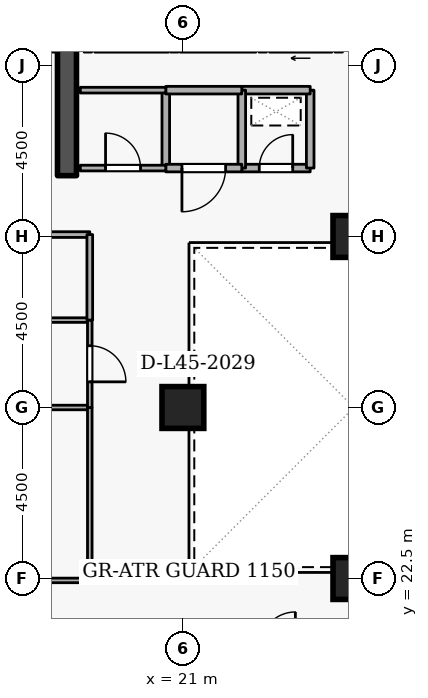
"""IFC4 building model, lengths in metres.
Left out: names, types, materials, properties, quantities, classifications, styles, units other than length and angle.
Written with IfcOpenShell. Run it as: python <this file> out.ifc"""

import sys

from ifc_helpers import new_model, si_unit, direction, frame, frame_2d, origin, origin_2d, place, context, subcontext, project, spatial, rectangle, extrude, element, fill, save


model = new_model("IFC4")
c1 = context("Model", 3, precision=1e-05, world=origin(), true_north=direction((0.0, 1.0)))
c2 = subcontext(c1, "Body", "Model", "MODEL_VIEW")
j1 = project(units=[si_unit("LENGTHUNIT", "METRE"), si_unit("PLANEANGLEUNIT", "RADIAN")], contexts=[c1])
p1 = place(None, origin())
s1 = spatial("IfcSite", under=j1, at=p1, CompositionType="ELEMENT")
p2 = place(p1, origin())
s2 = spatial("IfcBuilding", under=s1, at=p2, CompositionType="ELEMENT")
p3 = place(p2, frame((0.0, 0.0, 170.7)))
s3 = spatial("IfcBuildingStorey", under=s2, at=p3, CompositionType="ELEMENT", Elevation=170.7)
p4 = place(p3, frame((17.95, 33.1, 0.0), z_axis=(0.0, 0.0, 1.0), x_axis=(0.0, 1.0, 0.0)))
e1 = element("IfcWall", 1, at=p4, inside=s3, PredefinedType="SHEAR", context=c2, shape_type="SweptSolid", body=[
    extrude(rectangle(XDim=5.8, YDim=0.5, at=frame_2d((2.9, 0.0))), origin(), (0.0, 0.0, 1.0), 3.6),
])
for number, where, z_axis, x_axis in (
    (2, (25.5, 22.5, 0.0), (0.0, 0.0, 1.0), (1.0, 0.0, 0.0)),
    (3, (25.5, 31.5, 0.0), (0.0, 0.0, 1.0), (1.0, 0.0, 0.0)),
    (4, (21.0, 27.0, 0.0), (0.0, 0.0, 1.0), (1.0, 0.0, 0.0)),
):
    element("IfcColumn", number, at=place(p3, frame(where, z_axis=z_axis, x_axis=x_axis)), inside=s3, PredefinedType="COLUMN", context=c2, shape_type="SweptSolid", body=[
        extrude(rectangle(XDim=1.1, YDim=1.1, at=origin_2d()), origin(), (0.0, 0.0, 1.0), 3.6),
    ])
p5 = place(p3, frame((24.92, 36.45, 0.0), z_axis=(0.0, 0.0, 1.0), x_axis=(-1.0, 0.0, 0.0)))
e5 = element("IfcWall", 5, at=p5, inside=s3, PredefinedType="STANDARD", context=c2, shape_type="SweptSolid", body=[
    extrude(rectangle(XDim=1.64, YDim=0.2, at=frame_2d((0.82, 0.0))), origin(), (0.0, 0.0, 1.0), 3.26),
])
p6 = place(p5, frame((0.31, 0.0, 0.0)))
e6 = element("IfcOpeningElement", 6, at=p6, cuts=e5, PredefinedType="OPENING", context=c2, shape_type="SweptSolid", body=[
    extrude(rectangle(XDim=1.02, YDim=2.06, at=frame_2d((0.51, 1.03))), frame((0.0, 0.11, 0.0), z_axis=(0.0, -1.0, 0.0), x_axis=(1.0, 0.0, 0.0)), (0.0, 0.0, 1.0), 0.22),
])
p7 = place(p3, frame((22.92, 36.45, 0.0), z_axis=(0.0, 0.0, 1.0), x_axis=(-1.0, 0.0, 0.0)))
e7 = element("IfcWall", 7, at=p7, inside=s3, PredefinedType="STANDARD", context=c2, shape_type="SweptSolid", body=[
    extrude(rectangle(XDim=1.99, YDim=0.2, at=frame_2d((0.995, 0.0))), origin(), (0.0, 0.0, 1.0), 3.26),
])
p8 = place(p3, frame((20.62, 36.45, 0.0), z_axis=(0.0, 0.0, 1.0), x_axis=(-1.0, 0.0, 0.0)))
e8 = element("IfcWall", 8, at=p8, inside=s3, PredefinedType="STANDARD", context=c2, shape_type="SweptSolid", body=[
    extrude(rectangle(XDim=1.94, YDim=0.2, at=frame_2d((0.97, 0.0))), origin(), (0.0, 0.0, 1.0), 3.26),
])
p9 = place(p3, frame((22.55, 33.3, 0.0), z_axis=(0.0, 0.0, 1.0), x_axis=(1.0, 0.0, 0.0)))
e9 = element("IfcWall", 9, at=p9, inside=s3, PredefinedType="STANDARD", context=c2, shape_type="SweptSolid", body=[
    extrude(rectangle(XDim=1.8, YDim=0.2, at=frame_2d((0.9, 0.0))), origin(), (0.0, 0.0, 1.0), 3.26),
])
p10 = place(p9, frame((0.46, 0.0, 0.0)))
e10 = element("IfcOpeningElement", 10, at=p10, cuts=e9, PredefinedType="OPENING", context=c2, shape_type="SweptSolid", body=[
    extrude(rectangle(XDim=0.88, YDim=2.04, at=frame_2d((0.44, 1.02))), frame((0.0, 0.11, 0.0), z_axis=(0.0, -1.0, 0.0), x_axis=(1.0, 0.0, 0.0)), (0.0, 0.0, 1.0), 0.22),
])
p11 = place(p3, frame((24.35, 33.3, 0.0), z_axis=(0.0, 0.0, 1.0), x_axis=(0.0, 1.0, 0.0)))
e11 = element("IfcWall", 11, at=p11, inside=s3, PredefinedType="STANDARD", context=c2, shape_type="SweptSolid", body=[
    extrude(rectangle(XDim=2.05, YDim=0.2, at=frame_2d((1.025, 0.0))), origin(), (0.0, 0.0, 1.0), 3.26),
])
p12 = place(p3, frame((24.35, 35.35, 0.0), z_axis=(0.0, 0.0, 1.0), x_axis=(-1.0, 0.0, 0.0)))
e12 = element("IfcWall", 12, at=p12, inside=s3, PredefinedType="STANDARD", context=c2, shape_type="SweptSolid", body=[
    extrude(rectangle(XDim=1.8, YDim=0.2, at=frame_2d((0.9, 0.0))), origin(), (0.0, 0.0, 1.0), 3.26),
])
for number, where, z_axis, x_axis in (
    (13, (22.55, 35.35, 0.0), (0.0, 0.0, 1.0), (0.0, -1.0, 0.0)),
    (14, (20.55, 33.3, 0.0), (0.0, 0.0, 1.0), (0.0, 1.0, 0.0)),
):
    element("IfcWall", number, at=place(p3, frame(where, z_axis=z_axis, x_axis=x_axis)), inside=s3, PredefinedType="STANDARD", context=c2, shape_type="SweptSolid", body=[
        extrude(rectangle(XDim=2.05, YDim=0.2, at=frame_2d((1.025, 0.0))), origin(), (0.0, 0.0, 1.0), 3.26),
    ])
p13 = place(p3, frame((20.55, 35.35, 0.0), z_axis=(0.0, 0.0, 1.0), x_axis=(1.0, 0.0, 0.0)))
e15 = element("IfcWall", 15, at=p13, inside=s3, PredefinedType="STANDARD", context=c2, shape_type="SweptSolid", body=[
    extrude(rectangle(XDim=2.0, YDim=0.2, at=frame_2d((1.0, 0.0))), origin(), (0.0, 0.0, 1.0), 3.26),
])
p14 = place(p3, frame((22.55, 33.3, 0.0), z_axis=(0.0, 0.0, 1.0), x_axis=(-1.0, 0.0, 0.0)))
e16 = element("IfcWall", 16, at=p14, inside=s3, PredefinedType="STANDARD", context=c2, shape_type="SweptSolid", body=[
    extrude(rectangle(XDim=2.0, YDim=0.2, at=frame_2d((1.0, 0.0))), origin(), (0.0, 0.0, 1.0), 3.26),
])
p15 = place(p14, frame((0.425, 0.0, 0.0)))
e17 = element("IfcOpeningElement", 17, at=p15, cuts=e16, PredefinedType="OPENING", context=c2, shape_type="SweptSolid", body=[
    extrude(rectangle(XDim=1.15, YDim=2.1, at=frame_2d((0.575, 1.05))), frame((0.0, 0.11, 0.0), z_axis=(0.0, -1.0, 0.0), x_axis=(1.0, 0.0, 0.0)), (0.0, 0.0, 1.0), 0.22),
])
p16 = place(p3, frame((18.3, 33.3, 0.0), z_axis=(0.0, 0.0, 1.0), x_axis=(1.0, 0.0, 0.0)))
e18 = element("IfcWall", 18, at=p16, inside=s3, PredefinedType="PARTITIONING", context=c2, shape_type="SweptSolid", body=[
    extrude(rectangle(XDim=2.25, YDim=0.15, at=frame_2d((1.125, 0.0))), origin(), (0.0, 0.0, 1.0), 3.26),
])
p17 = place(p16, frame((0.665, 0.0, 0.0)))
e19 = element("IfcOpeningElement", 19, at=p17, cuts=e18, PredefinedType="OPENING", context=c2, shape_type="SweptSolid", body=[
    extrude(rectangle(XDim=0.92, YDim=2.08, at=frame_2d((0.46, 1.04))), frame((0.0, 0.085, 0.0), z_axis=(0.0, -1.0, 0.0), x_axis=(1.0, 0.0, 0.0)), (0.0, 0.0, 1.0), 0.17),
])
p18 = place(p3, frame((20.55, 35.35, 0.0), z_axis=(0.0, 0.0, 1.0), x_axis=(-1.0, 0.0, 0.0)))
e20 = element("IfcWall", 20, at=p18, inside=s3, PredefinedType="PARTITIONING", context=c2, shape_type="SweptSolid", body=[
    extrude(rectangle(XDim=2.25, YDim=0.15, at=frame_2d((1.125, 0.0))), origin(), (0.0, 0.0, 1.0), 3.26),
])
p19 = place(p3, frame((13.25, 27.0, 0.0), z_axis=(0.0, 0.0, 1.0), x_axis=(1.0, 0.0, 0.0)))
e21 = element("IfcWall", 21, at=p19, inside=s3, PredefinedType="PARTITIONING", context=c2, shape_type="SweptSolid", body=[
    extrude(rectangle(XDim=5.3, YDim=0.12, at=frame_2d((2.65, 0.0))), origin(), (0.0, 0.0, 1.0), 2.802),
])
p20 = place(p3, frame((18.55, 27.0, 0.0), z_axis=(0.0, 0.0, 1.0), x_axis=(0.0, -1.0, 0.0)))
e22 = element("IfcWall", 22, at=p20, inside=s3, PredefinedType="PARTITIONING", context=c2, shape_type="SweptSolid", body=[
    extrude(rectangle(XDim=4.55, YDim=0.12, at=frame_2d((2.275, 0.0))), origin(), (0.0, 0.0, 1.0), 3.26),
])
p21 = place(p3, frame((18.55, 22.45, 0.0), z_axis=(0.0, 0.0, 1.0), x_axis=(-1.0, 0.0, 0.0)))
e23 = element("IfcWall", 23, at=p21, inside=s3, PredefinedType="PARTITIONING", context=c2, shape_type="SweptSolid", body=[
    extrude(rectangle(XDim=5.3, YDim=0.12, at=frame_2d((2.65, 0.0))), origin(), (0.0, 0.0, 1.0), 3.26),
])
p22 = place(p21, frame((2.175, 0.0, 0.0)))
e24 = element("IfcOpeningElement", 24, at=p22, cuts=e23, PredefinedType="OPENING", context=c2, shape_type="SweptSolid", body=[
    extrude(rectangle(XDim=0.95, YDim=2.1, at=frame_2d((0.475, 1.05))), frame((0.0, 0.07, 0.0), z_axis=(0.0, -1.0, 0.0), x_axis=(1.0, 0.0, 0.0)), (0.0, 0.0, 1.0), 0.14),
])
p23 = place(p3, frame((13.25, 29.3, 0.0), z_axis=(0.0, 0.0, 1.0), x_axis=(1.0, 0.0, 0.0)))
e25 = element("IfcWall", 25, at=p23, inside=s3, PredefinedType="PARTITIONING", context=c2, shape_type="SweptSolid", body=[
    extrude(rectangle(XDim=5.3, YDim=0.12, at=frame_2d((2.65, 0.0))), origin(), (0.0, 0.0, 1.0), 3.26),
])
p24 = place(p3, frame((18.55, 29.3, 0.0), z_axis=(0.0, 0.0, 1.0), x_axis=(0.0, -1.0, 0.0)))
e26 = element("IfcWall", 26, at=p24, inside=s3, PredefinedType="PARTITIONING", context=c2, shape_type="SweptSolid", body=[
    extrude(rectangle(XDim=2.3, YDim=0.12, at=frame_2d((1.15, 0.0))), origin(), (0.0, 0.0, 1.0), 3.26),
])
p25 = place(p24, frame((0.675, 0.0, 0.0)))
e27 = element("IfcOpeningElement", 27, at=p25, cuts=e26, PredefinedType="OPENING", context=c2, shape_type="SweptSolid", body=[
    extrude(rectangle(XDim=0.95, YDim=2.1, at=frame_2d((0.475, 1.05))), frame((0.0, 0.07, 0.0), z_axis=(0.0, -1.0, 0.0), x_axis=(1.0, 0.0, 0.0)), (0.0, 0.0, 1.0), 0.14),
])
p26 = place(p3, frame((13.25, 31.55, 0.0), z_axis=(0.0, 0.0, 1.0), x_axis=(1.0, 0.0, 0.0)))
e28 = element("IfcWall", 28, at=p26, inside=s3, PredefinedType="PARTITIONING", context=c2, shape_type="SweptSolid", body=[
    extrude(rectangle(XDim=5.3, YDim=0.15, at=frame_2d((2.65, 0.0))), origin(), (0.0, 0.0, 1.0), 3.26),
])
p27 = place(p26, frame((2.0, 0.0, 0.0)))
e29 = element("IfcOpeningElement", 29, at=p27, cuts=e28, PredefinedType="OPENING", context=c2, shape_type="SweptSolid", body=[
    extrude(rectangle(XDim=1.3, YDim=2.12, at=frame_2d((0.65, 1.06))), frame((0.0, 0.085, 0.0), z_axis=(0.0, -1.0, 0.0), x_axis=(1.0, 0.0, 0.0)), (0.0, 0.0, 1.0), 0.17),
])
p28 = place(p3, frame((18.55, 31.55, 0.0), z_axis=(0.0, 0.0, 1.0), x_axis=(0.0, -1.0, 0.0)))
e30 = element("IfcWall", 30, at=p28, inside=s3, PredefinedType="PARTITIONING", context=c2, shape_type="SweptSolid", body=[
    extrude(rectangle(XDim=2.25, YDim=0.15, at=frame_2d((1.125, 0.0))), origin(), (0.0, 0.0, 1.0), 3.26),
])
p29 = place(p10, origin())
e31 = element("IfcDoor", 31, at=p29, inside=s3, OperationType="SINGLE_SWING_RIGHT", PredefinedType="DOOR", context=c2, shape_type="SweptSolid", body=[
    extrude(rectangle(XDim=0.88, YDim=2.04, at=frame_2d((0.44, 1.02))), frame((0.0, 0.025, 0.0), z_axis=(0.0, -1.0, 0.0), x_axis=(1.0, 0.0, 0.0)), (0.0, 0.0, 1.0), 0.05),
])
fill(e10, e31)
p30 = place(p17, origin())
e32 = element("IfcDoor", 32, at=p30, inside=s3, OperationType="SINGLE_SWING_LEFT", PredefinedType="DOOR", context=c2, shape_type="SweptSolid", body=[
    extrude(rectangle(XDim=0.92, YDim=2.08, at=frame_2d((0.46, 1.04))), frame((0.0, 0.025, 0.0), z_axis=(0.0, -1.0, 0.0), x_axis=(1.0, 0.0, 0.0)), (0.0, 0.0, 1.0), 0.05),
])
fill(e19, e32)
p31 = place(p15, origin())
e33 = element("IfcDoor", 33, at=p31, inside=s3, OperationType="SINGLE_SWING_RIGHT", PredefinedType="DOOR", context=c2, shape_type="SweptSolid", body=[
    extrude(rectangle(XDim=1.15, YDim=2.1, at=frame_2d((0.575, 1.05))), frame((0.0, 0.025, 0.0), z_axis=(0.0, -1.0, 0.0), x_axis=(1.0, 0.0, 0.0)), (0.0, 0.0, 1.0), 0.05),
])
fill(e17, e33)
p32 = place(p25, origin())
e34 = element("IfcDoor", 34, at=p32, inside=s3, OperationType="SINGLE_SWING_RIGHT", PredefinedType="DOOR", context=c2, shape_type="SweptSolid", body=[
    extrude(rectangle(XDim=0.95, YDim=2.1, at=frame_2d((0.475, 1.05))), frame((0.0, 0.025, 0.0), z_axis=(0.0, -1.0, 0.0), x_axis=(1.0, 0.0, 0.0)), (0.0, 0.0, 1.0), 0.05),
])
fill(e27, e34)
save(model, sys.argv[1])
